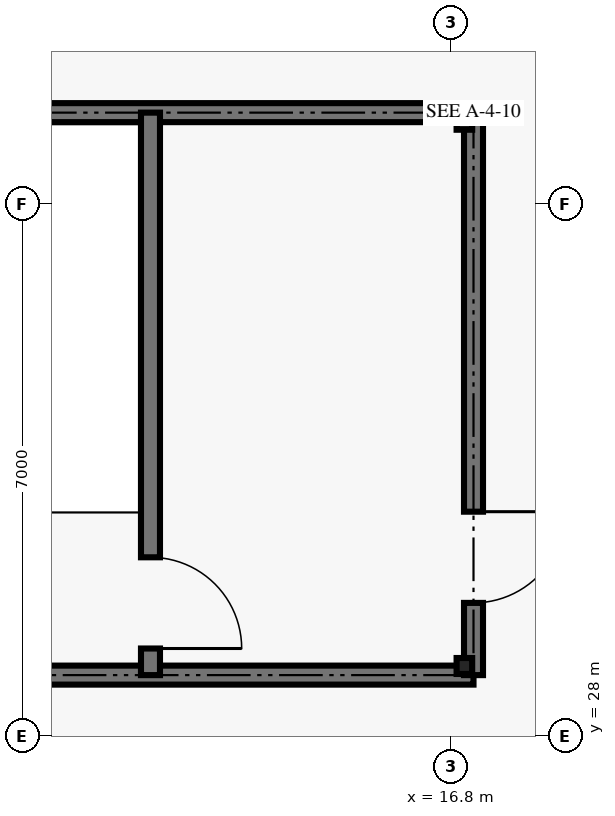
"""IFC4 building model, lengths in metres.
Left out: names, types, materials, properties, quantities, classifications, styles, units other than length and angle.
Written with IfcOpenShell. Run it as: python <this file> out.ifc"""

import sys

from ifc_helpers import new_model, si_unit, direction, frame, frame_2d, origin, origin_2d, place, context, subcontext, project, spatial, rectangle, i_section, extrude, element, fill, save


model = new_model("IFC4")
c1 = context("Model", 3, precision=1e-05, world=origin(), true_north=direction((0.0, 1.0)))
c2 = subcontext(c1, "Body", "Model", "MODEL_VIEW")
j1 = project(units=[si_unit("LENGTHUNIT", "METRE"), si_unit("PLANEANGLEUNIT", "RADIAN")], contexts=[c1])
p1 = place(None, origin())
s1 = spatial("IfcSite", under=j1, at=p1, CompositionType="ELEMENT")
p2 = place(p1, origin())
s2 = spatial("IfcBuilding", under=s1, at=p2, CompositionType="ELEMENT")
p3 = place(p2, frame((0.0, 0.0, 5.4)))
s3 = spatial("IfcBuildingStorey", under=s2, at=p3, CompositionType="ELEMENT", Elevation=5.4)
for number, where, z_axis, x_axis in (
    (1, (16.98, 28.92, 0.0), (0.0, 0.0, 1.0), (1.0, 0.0, 0.0)),
    (2, (16.98, 36.08, 0.0), (0.0, 0.0, 1.0), (1.0, 0.0, 0.0)),
):
    element("IfcColumn", number, at=place(p3, frame(where, z_axis=z_axis, x_axis=x_axis)), inside=s3, PredefinedType="COLUMN", context=c2, shape_type="SweptSolid", body=[
        extrude(i_section(OverallWidth=0.205, OverallDepth=0.21, WebThickness=0.009, FlangeThickness=0.014, FilletRadius=0.01, at=origin_2d()), origin(), (0.0, 0.0, 1.0), 4.8),
    ])
for number, where, z_axis, x_axis in (
    (3, (7.9, 36.2, 0.0), (0.0, 0.0, 1.0), (1.0, 0.0, 0.0)),
    (4, (17.1, 28.8, 0.0), (0.0, 0.0, 1.0), (-1.0, 0.0, 0.0)),
):
    element("IfcWall", number, at=place(p3, frame(where, z_axis=z_axis, x_axis=x_axis)), inside=s3, PredefinedType="SHEAR", context=c2, shape_type="SweptSolid", body=[
        extrude(rectangle(XDim=9.2, YDim=0.25, at=frame_2d((4.6, 0.0))), origin(), (0.0, 0.0, 1.0), 4.56),
    ])
p4 = place(p3, frame((17.1, 36.2, 0.0), z_axis=(0.0, 0.0, 1.0), x_axis=(0.0, -1.0, 0.0)))
e5 = element("IfcWall", 5, at=p4, inside=s3, PredefinedType="SHEAR", context=c2, shape_type="SweptSolid", body=[
    extrude(rectangle(XDim=7.4, YDim=0.25, at=frame_2d((3.7, 0.0))), origin(), (0.0, 0.0, 1.0), 4.56),
])
p5 = place(p4, frame((5.25, 0.0, 0.0)))
e6 = element("IfcOpeningElement", 6, at=p5, cuts=e5, PredefinedType="OPENING", context=c2, shape_type="SweptSolid", body=[
    extrude(rectangle(XDim=1.2, YDim=2.2, at=frame_2d((0.6, 1.1))), frame((0.0, 0.135, 0.0), z_axis=(0.0, -1.0, 0.0), x_axis=(1.0, 0.0, 0.0)), (0.0, 0.0, 1.0), 0.27),
])
p6 = place(p3, frame((12.85, 36.2, 0.0), z_axis=(0.0, 0.0, 1.0), x_axis=(0.0, -1.0, 0.0)))
e7 = element("IfcWall", 7, at=p6, inside=s3, PredefinedType="SHEAR", context=c2, shape_type="SweptSolid", body=[
    extrude(rectangle(XDim=7.4, YDim=0.25, at=frame_2d((3.7, 0.0))), origin(), (0.0, 0.0, 1.0), 4.56),
])
p7 = place(p6, frame((5.85, 0.0, 0.0)))
e8 = element("IfcOpeningElement", 8, at=p7, cuts=e7, PredefinedType="OPENING", context=c2, shape_type="SweptSolid", body=[
    extrude(rectangle(XDim=1.2, YDim=2.2, at=frame_2d((0.6, 1.1))), frame((0.0, 0.135, 0.0), z_axis=(0.0, -1.0, 0.0), x_axis=(1.0, 0.0, 0.0)), (0.0, 0.0, 1.0), 0.27),
])
p8 = place(p5, origin())
e9 = element("IfcDoor", 9, at=p8, inside=s3, OperationType="SINGLE_SWING_LEFT", PredefinedType="DOOR", context=c2, shape_type="SweptSolid", body=[
    extrude(rectangle(XDim=1.2, YDim=2.2, at=frame_2d((0.6, 1.1))), frame((0.0, 0.025, 0.0), z_axis=(0.0, -1.0, 0.0), x_axis=(1.0, 0.0, 0.0)), (0.0, 0.0, 1.0), 0.05),
])
fill(e6, e9)
p9 = place(p7, origin())
e10 = element("IfcDoor", 10, at=p9, inside=s3, OperationType="SINGLE_SWING_RIGHT", PredefinedType="DOOR", context=c2, shape_type="SweptSolid", body=[
    extrude(rectangle(XDim=1.2, YDim=2.2, at=frame_2d((0.6, 1.1))), frame((0.0, 0.025, 0.0), z_axis=(0.0, -1.0, 0.0), x_axis=(1.0, 0.0, 0.0)), (0.0, 0.0, 1.0), 0.05),
])
fill(e8, e10)
save(model, sys.argv[1])
